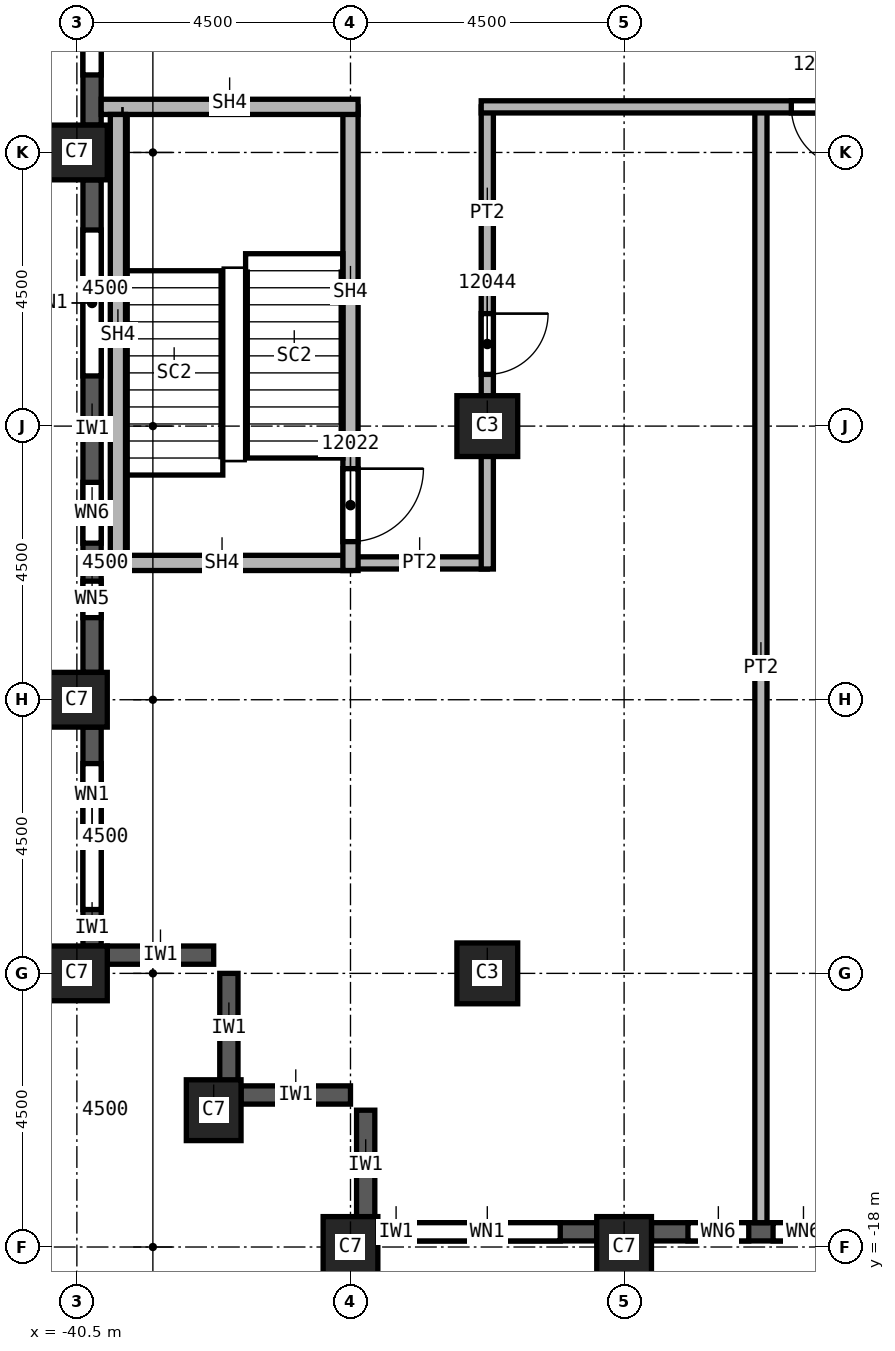
"""IFC4 building model, lengths in metres.
Left out: names, types, materials, properties, quantities, classifications, styles, units other than length and angle.
Written with IfcOpenShell. Run it as: python <this file> out.ifc"""

import sys

from ifc_helpers import new_model, si_unit, direction, frame, frame_2d, origin, origin_2d, place, context, subcontext, project, spatial, rectangle, extrude, element, fill, save


model = new_model("IFC4")
c1 = context("Model", 3, precision=1e-05, world=origin(), true_north=direction((0.0, 1.0)))
c2 = subcontext(c1, "Body", "Model", "MODEL_VIEW")
j1 = project(units=[si_unit("LENGTHUNIT", "METRE"), si_unit("PLANEANGLEUNIT", "RADIAN")], contexts=[c1])
p1 = place(None, origin())
s1 = spatial("IfcSite", under=j1, at=p1, CompositionType="ELEMENT")
p2 = place(p1, origin())
s2 = spatial("IfcBuilding", under=s1, at=p2, CompositionType="ELEMENT")
p3 = place(p2, frame((0.0, 0.0, 196.0)))
s3 = spatial("IfcBuildingStorey", under=s2, at=p3, CompositionType="ELEMENT", Elevation=196.0)
for number, where, z_axis, x_axis in (
    (1, (-40.5, 0.0, 0.0), (0.0, 0.0, 1.0), (0.0, 1.0, 0.0)),
    (2, (-40.5, -9.0, 0.0), (0.0, 0.0, 1.0), (0.0, 1.0, 0.0)),
    (3, (-40.5, -13.5, 0.0), (0.0, 0.0, 1.0), (0.0, 1.0, 0.0)),
    (4, (-38.25, -15.75, 0.0), (0.0, 0.0, 1.0), (1.0, 0.0, 0.0)),
    (5, (-31.5, -18.0, 0.0), (0.0, 0.0, 1.0), (1.0, 0.0, 0.0)),
    (6, (-36.0, -18.0, 0.0), (0.0, 0.0, 1.0), (1.0, 0.0, 0.0)),
):
    element("IfcColumn", number, at=place(p3, frame(where, z_axis=z_axis, x_axis=x_axis)), inside=s3, PredefinedType="COLUMN", context=c2, shape_type="SweptSolid", body=[
        extrude(rectangle(XDim=0.9, YDim=1.0, at=origin_2d()), origin(), (0.0, 0.0, 1.0), 3.72),
    ])
for number, where, z_axis, x_axis in (
    (7, (-33.75, -4.5, 0.0), (0.0, 0.0, 1.0), (1.0, 0.0, 0.0)),
    (8, (-33.75, -13.5, 0.0), (0.0, 0.0, 1.0), (1.0, 0.0, 0.0)),
):
    element("IfcColumn", number, at=place(p3, frame(where, z_axis=z_axis, x_axis=x_axis)), inside=s3, PredefinedType="COLUMN", context=c2, shape_type="SweptSolid", body=[
        extrude(rectangle(XDim=1.0, YDim=1.0, at=origin_2d()), origin(), (0.0, 0.0, 1.0), 3.72),
    ])
p4 = place(p3, frame((-40.0, -13.2, 0.0), z_axis=(0.0, 0.0, 1.0), x_axis=(1.0, 0.0, 0.0)))
e9 = element("IfcWall", 9, at=p4, inside=s3, PredefinedType="SOLIDWALL", context=c2, shape_type="SweptSolid", body=[
    extrude(rectangle(XDim=1.75, YDim=0.3, at=frame_2d((0.875, 0.0))), origin(), (0.0, 0.0, 1.0), 3.12),
])
for number, where, z_axis, x_axis in (
    (10, (-38.0, -15.3, 0.0), (0.0, 0.0, 1.0), (0.0, 1.0, 0.0)),
    (11, (-37.8, -15.5, 0.0), (0.0, 0.0, 1.0), (1.0, 0.0, 0.0)),
    (12, (-35.75, -17.55, 0.0), (0.0, 0.0, 1.0), (0.0, 1.0, 0.0)),
):
    element("IfcWall", number, at=place(p3, frame(where, z_axis=z_axis, x_axis=x_axis)), inside=s3, PredefinedType="SOLIDWALL", context=c2, shape_type="SweptSolid", body=[
        extrude(rectangle(XDim=1.8, YDim=0.3, at=frame_2d((0.9, 0.0))), origin(), (0.0, 0.0, 1.0), 3.12),
    ])
p5 = place(p3, frame((-40.25, 8.55, 0.0), z_axis=(0.0, 0.0, 1.0), x_axis=(0.0, -1.0, 0.0)))
e13 = element("IfcWall", 13, at=p5, inside=s3, PredefinedType="SOLIDWALL", context=c2, shape_type="SweptSolid", body=[
    extrude(rectangle(XDim=8.1, YDim=0.3, at=frame_2d((4.05, 0.0))), origin(), (0.0, 0.0, 1.0), 3.12),
])
p6 = place(p5, frame((0.825, 0.0, 0.8)))
e14 = element("IfcOpeningElement", 14, at=p6, cuts=e13, PredefinedType="OPENING", context=c2, shape_type="SweptSolid", body=[
    extrude(rectangle(XDim=2.4, YDim=1.95, at=frame_2d((1.2, 0.975))), frame((0.0, 0.15, 0.0), z_axis=(0.0, -1.0, 0.0), x_axis=(1.0, 0.0, 0.0)), (0.0, 0.0, 1.0), 0.3),
])
p7 = place(p5, frame((4.875, 0.0, 0.8)))
e15 = element("IfcOpeningElement", 15, at=p7, cuts=e13, PredefinedType="OPENING", context=c2, shape_type="SweptSolid", body=[
    extrude(rectangle(XDim=2.4, YDim=1.95, at=frame_2d((1.2, 0.975))), frame((0.0, 0.15, 0.0), z_axis=(0.0, -1.0, 0.0), x_axis=(1.0, 0.0, 0.0)), (0.0, 0.0, 1.0), 0.3),
])
p8 = place(p3, frame((-40.25, -0.45, 0.0), z_axis=(0.0, 0.0, 1.0), x_axis=(0.0, -1.0, 0.0)))
e16 = element("IfcWall", 16, at=p8, inside=s3, PredefinedType="SOLIDWALL", context=c2, shape_type="SweptSolid", body=[
    extrude(rectangle(XDim=8.1, YDim=0.3, at=frame_2d((4.05, 0.0))), origin(), (0.0, 0.0, 1.0), 3.12),
])
p9 = place(p8, frame((0.825, 0.0, 0.8)))
e17 = element("IfcOpeningElement", 17, at=p9, cuts=e16, PredefinedType="OPENING", context=c2, shape_type="SweptSolid", body=[
    extrude(rectangle(XDim=2.4, YDim=1.95, at=frame_2d((1.2, 0.975))), frame((0.0, 0.15, 0.0), z_axis=(0.0, -1.0, 0.0), x_axis=(1.0, 0.0, 0.0)), (0.0, 0.0, 1.0), 0.3),
])
p10 = place(p8, frame((4.975, 0.0, 0.8)))
e18 = element("IfcOpeningElement", 18, at=p10, cuts=e16, PredefinedType="OPENING", context=c2, shape_type="SweptSolid", body=[
    extrude(rectangle(XDim=1.0, YDim=1.95, at=frame_2d((0.5, 0.975))), frame((0.0, 0.15, 0.0), z_axis=(0.0, -1.0, 0.0), x_axis=(1.0, 0.0, 0.0)), (0.0, 0.0, 1.0), 0.3),
])
p11 = place(p8, frame((6.6, 0.0, 0.8)))
e19 = element("IfcOpeningElement", 19, at=p11, cuts=e16, PredefinedType="OPENING", context=c2, shape_type="SweptSolid", body=[
    extrude(rectangle(XDim=0.6, YDim=1.95, at=frame_2d((0.3, 0.975))), frame((0.0, 0.15, 0.0), z_axis=(0.0, -1.0, 0.0), x_axis=(1.0, 0.0, 0.0)), (0.0, 0.0, 1.0), 0.3),
])
p12 = place(p3, frame((-40.25, -9.45, 0.0), z_axis=(0.0, 0.0, 1.0), x_axis=(0.0, -1.0, 0.0)))
e20 = element("IfcWall", 20, at=p12, inside=s3, PredefinedType="SOLIDWALL", context=c2, shape_type="SweptSolid", body=[
    extrude(rectangle(XDim=3.6, YDim=0.3, at=frame_2d((1.8, 0.0))), origin(), (0.0, 0.0, 1.0), 3.12),
])
p13 = place(p12, frame((0.6, 0.0, 0.8)))
e21 = element("IfcOpeningElement", 21, at=p13, cuts=e20, PredefinedType="OPENING", context=c2, shape_type="SweptSolid", body=[
    extrude(rectangle(XDim=2.4, YDim=1.95, at=frame_2d((1.2, 0.975))), frame((0.0, 0.15, 0.0), z_axis=(0.0, -1.0, 0.0), x_axis=(1.0, 0.0, 0.0)), (0.0, 0.0, 1.0), 0.3),
])
p14 = place(p3, frame((-35.55, -17.75, 0.0), z_axis=(0.0, 0.0, 1.0), x_axis=(1.0, 0.0, 0.0)))
e22 = element("IfcWall", 22, at=p14, inside=s3, PredefinedType="SOLIDWALL", context=c2, shape_type="SweptSolid", body=[
    extrude(rectangle(XDim=3.6, YDim=0.3, at=frame_2d((1.8, 0.0))), origin(), (0.0, 0.0, 1.0), 3.12),
])
p15 = place(p14, frame((0.6, 0.0, 0.8)))
e23 = element("IfcOpeningElement", 23, at=p15, cuts=e22, PredefinedType="OPENING", context=c2, shape_type="SweptSolid", body=[
    extrude(rectangle(XDim=2.4, YDim=1.95, at=frame_2d((1.2, 0.975))), frame((0.0, 0.15, 0.0), z_axis=(0.0, -1.0, 0.0), x_axis=(1.0, 0.0, 0.0)), (0.0, 0.0, 1.0), 0.3),
])
p16 = place(p3, frame((-31.05, -17.75, 0.0), z_axis=(0.0, 0.0, 1.0), x_axis=(1.0, 0.0, 0.0)))
e24 = element("IfcWall", 24, at=p16, inside=s3, PredefinedType="SOLIDWALL", context=c2, shape_type="SweptSolid", body=[
    extrude(rectangle(XDim=3.6, YDim=0.3, at=frame_2d((1.8, 0.0))), origin(), (0.0, 0.0, 1.0), 3.12),
])
p17 = place(p16, frame((0.6, 0.0, 0.8)))
e25 = element("IfcOpeningElement", 25, at=p17, cuts=e24, PredefinedType="OPENING", context=c2, shape_type="SweptSolid", body=[
    extrude(rectangle(XDim=1.0, YDim=1.95, at=frame_2d((0.5, 0.975))), frame((0.0, 0.15, 0.0), z_axis=(0.0, -1.0, 0.0), x_axis=(1.0, 0.0, 0.0)), (0.0, 0.0, 1.0), 0.3),
])
p18 = place(p16, frame((2.0, 0.0, 0.8)))
e26 = element("IfcOpeningElement", 26, at=p18, cuts=e24, PredefinedType="OPENING", context=c2, shape_type="SweptSolid", body=[
    extrude(rectangle(XDim=1.0, YDim=1.95, at=frame_2d((0.5, 0.975))), frame((0.0, 0.15, 0.0), z_axis=(0.0, -1.0, 0.0), x_axis=(1.0, 0.0, 0.0)), (0.0, 0.0, 1.0), 0.3),
])
p19 = place(p3, frame((-33.75, -6.75, 0.0), z_axis=(0.0, 0.0, 1.0), x_axis=(-1.0, 0.0, 0.0)))
e27 = element("IfcWall", 27, at=p19, inside=s3, PredefinedType="PARTITIONING", context=c2, shape_type="SweptSolid", body=[
    extrude(rectangle(XDim=2.25, YDim=0.2, at=frame_2d((1.125, 0.0))), origin(), (0.0, 0.0, 1.0), 3.72),
])
p20 = place(p3, frame((-33.75, 0.75, 0.0), z_axis=(0.0, 0.0, 1.0), x_axis=(0.0, -1.0, 0.0)))
e28 = element("IfcWall", 28, at=p20, inside=s3, PredefinedType="PARTITIONING", context=c2, shape_type="SweptSolid", body=[
    extrude(rectangle(XDim=7.6, YDim=0.2, at=frame_2d((3.8, 0.0))), origin(), (0.0, 0.0, 1.0), 3.72),
])
p21 = place(p20, frame((3.4, 0.0, 0.0)))
e29 = element("IfcOpeningElement", 29, at=p21, cuts=e28, PredefinedType="OPENING", context=c2, shape_type="SweptSolid", body=[
    extrude(rectangle(XDim=1.0, YDim=2.1, at=frame_2d((0.5, 1.05))), frame((0.0, 0.1, 0.0), z_axis=(0.0, -1.0, 0.0), x_axis=(1.0, 0.0, 0.0)), (0.0, 0.0, 1.0), 0.2),
])
p22 = place(p3, frame((-29.25, 0.75, 0.0), z_axis=(0.0, 0.0, 1.0), x_axis=(0.0, -1.0, 0.0)))
e30 = element("IfcWall", 30, at=p22, inside=s3, PredefinedType="PARTITIONING", context=c2, shape_type="SweptSolid", body=[
    extrude(rectangle(XDim=18.35, YDim=0.2, at=frame_2d((9.175, 0.0))), origin(), (0.0, 0.0, 1.0), 3.72),
])
p23 = place(p3, frame((-19.9, 0.75, 0.0), z_axis=(0.0, 0.0, 1.0), x_axis=(-1.0, 0.0, 0.0)))
e31 = element("IfcWall", 31, at=p23, inside=s3, PredefinedType="PARTITIONING", context=c2, shape_type="SweptSolid", body=[
    extrude(rectangle(XDim=13.95, YDim=0.2, at=frame_2d((6.975, 0.0))), origin(), (0.0, 0.0, 1.0), 3.72),
])
p24 = place(p23, frame((7.85, 0.0, 0.0)))
e32 = element("IfcOpeningElement", 32, at=p24, cuts=e31, PredefinedType="OPENING", context=c2, shape_type="SweptSolid", body=[
    extrude(rectangle(XDim=1.0, YDim=2.1, at=frame_2d((0.5, 1.05))), frame((0.0, 0.1, 0.0), z_axis=(0.0, -1.0, 0.0), x_axis=(1.0, 0.0, 0.0)), (0.0, 0.0, 1.0), 0.2),
])
p25 = place(p3, frame((-36.0, -6.75, 0.0), z_axis=(0.0, 0.0, 1.0), x_axis=(-1.0, 0.0, 0.0)))
e33 = element("IfcWall", 33, at=p25, inside=s3, PredefinedType="SOLIDWALL", context=c2, shape_type="SweptSolid", body=[
    extrude(rectangle(XDim=4.1, YDim=0.25, at=frame_2d((2.05, 0.0))), origin(), (0.0, 0.0, 1.0), 3.72),
])
p26 = place(p3, frame((-36.0, 0.75, 0.0), z_axis=(0.0, 0.0, 1.0), x_axis=(0.0, -1.0, 0.0)))
e34 = element("IfcWall", 34, at=p26, inside=s3, PredefinedType="SOLIDWALL", context=c2, shape_type="SweptSolid", body=[
    extrude(rectangle(XDim=7.625, YDim=0.25, at=frame_2d((3.812, 0.0))), origin(), (0.0, 0.0, 1.0), 3.72),
])
p27 = place(p26, frame((5.95, 0.0, 0.0)))
e35 = element("IfcOpeningElement", 35, at=p27, cuts=e34, PredefinedType="OPENING", context=c2, shape_type="SweptSolid", body=[
    extrude(rectangle(XDim=1.2, YDim=2.1, at=frame_2d((0.6, 1.05))), frame((0.0, 0.125, 0.0), z_axis=(0.0, -1.0, 0.0), x_axis=(1.0, 0.0, 0.0)), (0.0, 0.0, 1.0), 0.25),
])
p28 = place(p3, frame((-35.875, 0.75, 0.0), z_axis=(0.0, 0.0, 1.0), x_axis=(-1.0, 0.0, 0.0)))
e36 = element("IfcWall", 36, at=p28, inside=s3, PredefinedType="SOLIDWALL", context=c2, shape_type="SweptSolid", body=[
    extrude(rectangle(XDim=4.225, YDim=0.25, at=frame_2d((2.113, 0.0))), origin(), (0.0, 0.0, 1.0), 3.72),
])
p29 = place(p3, frame((-39.825, -6.625, 0.0), z_axis=(0.0, 0.0, 1.0), x_axis=(0.0, 1.0, 0.0)))
e37 = element("IfcWall", 37, at=p29, inside=s3, PredefinedType="SOLIDWALL", context=c2, shape_type="SweptSolid", body=[
    extrude(rectangle(XDim=7.25, YDim=0.25, at=frame_2d((3.625, 0.0))), origin(), (0.0, 0.0, 1.0), 3.72),
])
p30 = place(p7, origin())
e38 = element("IfcWindow", 38, at=p30, inside=s3, PartitioningType="SINGLE_PANEL", PredefinedType="WINDOW", context=c2, shape_type="SweptSolid", body=[
    extrude(rectangle(XDim=2.4, YDim=1.95, at=frame_2d((1.2, 0.975))), frame((0.0, 0.03, 0.0), z_axis=(0.0, -1.0, 0.0), x_axis=(1.0, 0.0, 0.0)), (0.0, 0.0, 1.0), 0.06),
])
fill(e15, e38)
p31 = place(p9, origin())
e39 = element("IfcWindow", 39, at=p31, inside=s3, PartitioningType="SINGLE_PANEL", PredefinedType="WINDOW", context=c2, shape_type="SweptSolid", body=[
    extrude(rectangle(XDim=2.4, YDim=1.95, at=frame_2d((1.2, 0.975))), frame((0.0, 0.03, 0.0), z_axis=(0.0, -1.0, 0.0), x_axis=(1.0, 0.0, 0.0)), (0.0, 0.0, 1.0), 0.06),
])
fill(e17, e39)
p32 = place(p13, origin())
e40 = element("IfcWindow", 40, at=p32, inside=s3, PartitioningType="SINGLE_PANEL", PredefinedType="WINDOW", context=c2, shape_type="SweptSolid", body=[
    extrude(rectangle(XDim=2.4, YDim=1.95, at=frame_2d((1.2, 0.975))), frame((0.0, 0.03, 0.0), z_axis=(0.0, -1.0, 0.0), x_axis=(1.0, 0.0, 0.0)), (0.0, 0.0, 1.0), 0.06),
])
fill(e21, e40)
p33 = place(p15, origin())
e41 = element("IfcWindow", 41, at=p33, inside=s3, PartitioningType="SINGLE_PANEL", PredefinedType="WINDOW", context=c2, shape_type="SweptSolid", body=[
    extrude(rectangle(XDim=2.4, YDim=1.95, at=frame_2d((1.2, 0.975))), frame((0.0, 0.03, 0.0), z_axis=(0.0, -1.0, 0.0), x_axis=(1.0, 0.0, 0.0)), (0.0, 0.0, 1.0), 0.06),
])
fill(e23, e41)
p34 = place(p27, origin())
e42 = element("IfcDoor", 42, at=p34, inside=s3, OperationType="SINGLE_SWING_LEFT", PredefinedType="DOOR", context=c2, shape_type="SweptSolid", body=[
    extrude(rectangle(XDim=1.2, YDim=2.1, at=frame_2d((0.6, 1.05))), frame((0.0, 0.025, 0.0), z_axis=(0.0, -1.0, 0.0), x_axis=(1.0, 0.0, 0.0)), (0.0, 0.0, 1.0), 0.05),
])
fill(e35, e42)
p35 = place(p21, origin())
e43 = element("IfcDoor", 43, at=p35, inside=s3, OperationType="SINGLE_SWING_LEFT", PredefinedType="DOOR", context=c2, shape_type="SweptSolid", body=[
    extrude(rectangle(XDim=1.0, YDim=2.1, at=frame_2d((0.5, 1.05))), frame((0.0, 0.025, 0.0), z_axis=(0.0, -1.0, 0.0), x_axis=(1.0, 0.0, 0.0)), (0.0, 0.0, 1.0), 0.05),
])
fill(e29, e43)
p36 = place(p24, origin())
e44 = element("IfcDoor", 44, at=p36, inside=s3, OperationType="SINGLE_SWING_RIGHT", PredefinedType="DOOR", context=c2, shape_type="SweptSolid", body=[
    extrude(rectangle(XDim=1.0, YDim=2.1, at=frame_2d((0.5, 1.05))), frame((0.0, 0.025, 0.0), z_axis=(0.0, -1.0, 0.0), x_axis=(1.0, 0.0, 0.0)), (0.0, 0.0, 1.0), 0.05),
])
fill(e32, e44)
p37 = place(p10, origin())
e45 = element("IfcWindow", 45, at=p37, inside=s3, PartitioningType="SINGLE_PANEL", PredefinedType="WINDOW", context=c2, shape_type="SweptSolid", body=[
    extrude(rectangle(XDim=1.0, YDim=1.95, at=frame_2d((0.5, 0.975))), frame((0.0, 0.03, 0.0), z_axis=(0.0, -1.0, 0.0), x_axis=(1.0, 0.0, 0.0)), (0.0, 0.0, 1.0), 0.06),
])
fill(e18, e45)
p38 = place(p11, origin())
e46 = element("IfcWindow", 46, at=p38, inside=s3, PartitioningType="SINGLE_PANEL", PredefinedType="WINDOW", context=c2, shape_type="SweptSolid", body=[
    extrude(rectangle(XDim=0.6, YDim=1.95, at=frame_2d((0.3, 0.975))), frame((0.0, 0.03, 0.0), z_axis=(0.0, -1.0, 0.0), x_axis=(1.0, 0.0, 0.0)), (0.0, 0.0, 1.0), 0.06),
])
fill(e19, e46)
p39 = place(p17, origin())
e47 = element("IfcWindow", 47, at=p39, inside=s3, PartitioningType="SINGLE_PANEL", PredefinedType="WINDOW", context=c2, shape_type="SweptSolid", body=[
    extrude(rectangle(XDim=1.0, YDim=1.95, at=frame_2d((0.5, 0.975))), frame((0.0, 0.03, 0.0), z_axis=(0.0, -1.0, 0.0), x_axis=(1.0, 0.0, 0.0)), (0.0, 0.0, 1.0), 0.06),
])
fill(e25, e47)
p40 = place(p18, origin())
e48 = element("IfcWindow", 48, at=p40, inside=s3, PartitioningType="SINGLE_PANEL", PredefinedType="WINDOW", context=c2, shape_type="SweptSolid", body=[
    extrude(rectangle(XDim=1.0, YDim=1.95, at=frame_2d((0.5, 0.975))), frame((0.0, 0.03, 0.0), z_axis=(0.0, -1.0, 0.0), x_axis=(1.0, 0.0, 0.0)), (0.0, 0.0, 1.0), 0.06),
])
fill(e26, e48)
save(model, sys.argv[1])
